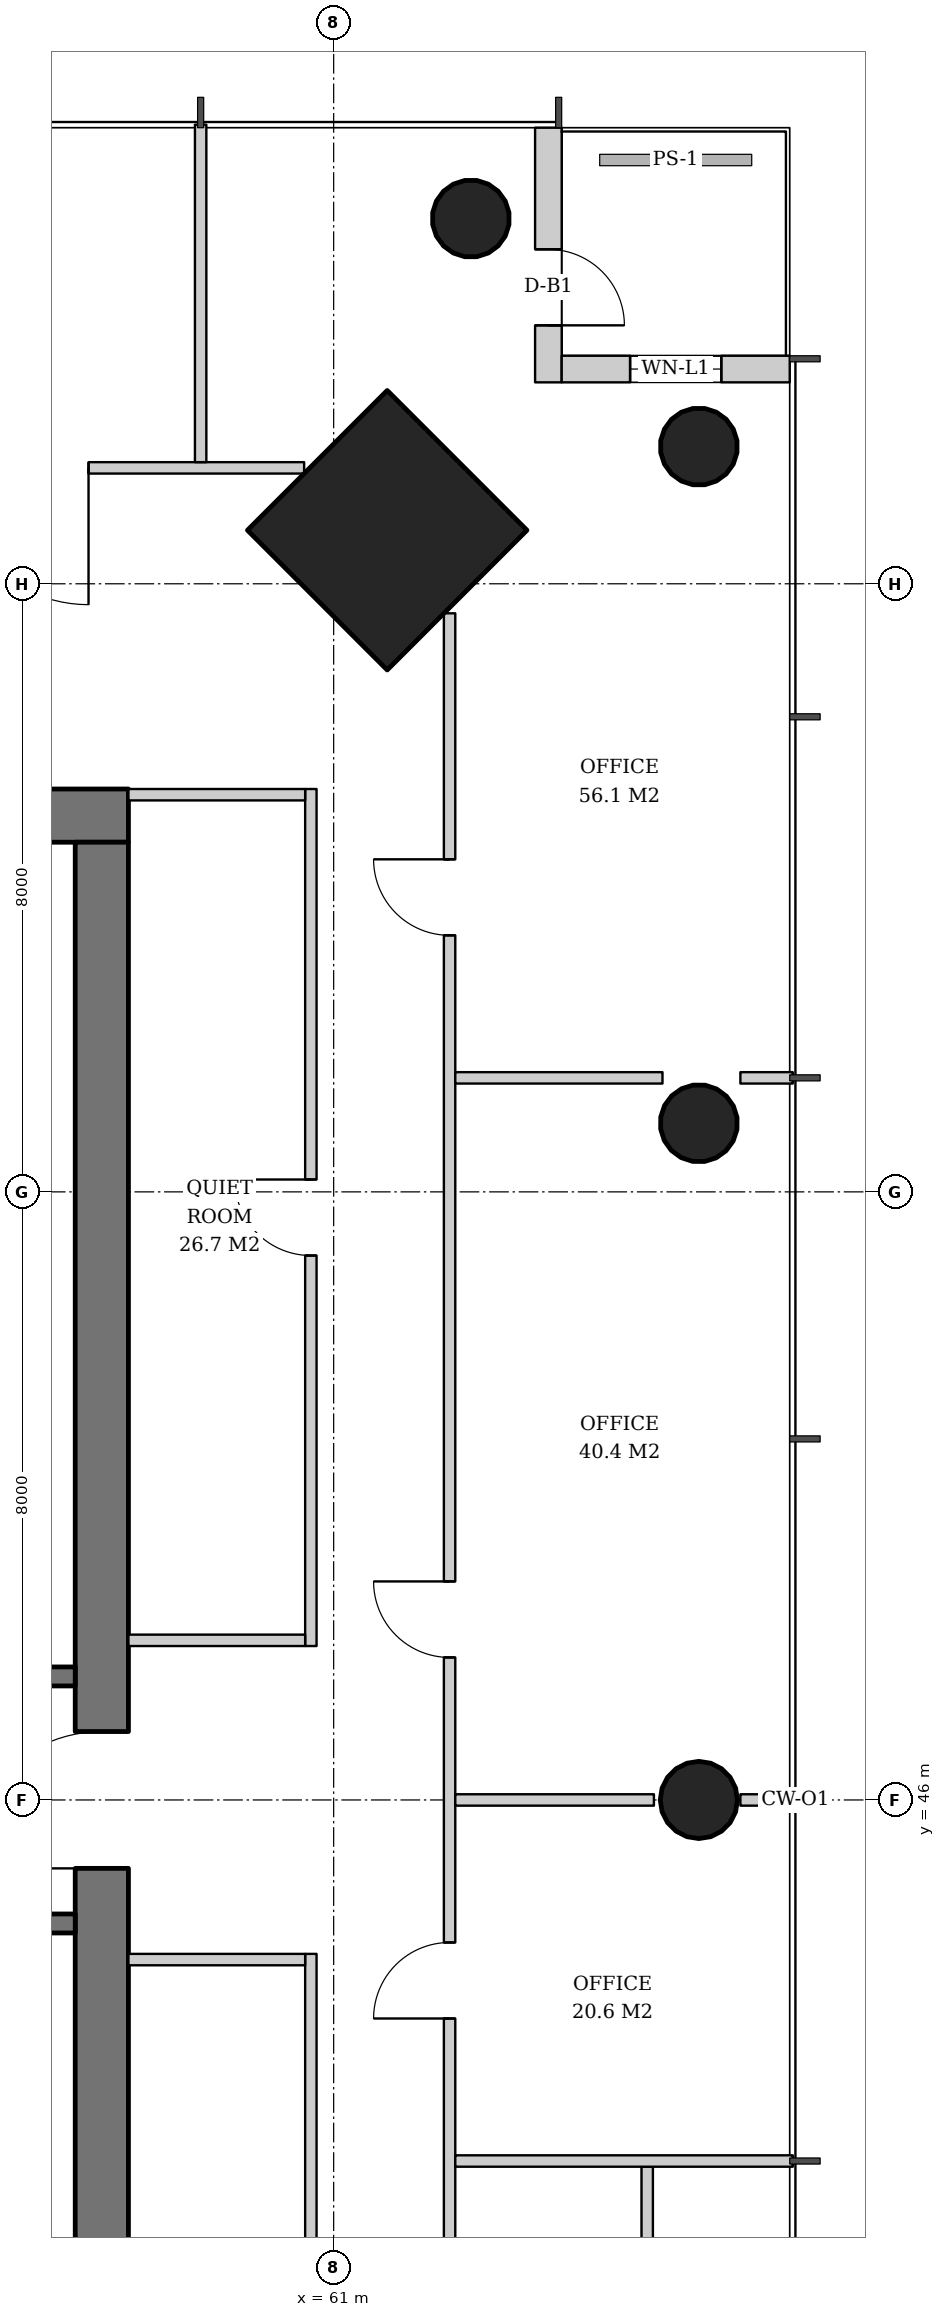
"""IFC4 building model, lengths in metres.
Left out: names, types, materials, properties, quantities, classifications, styles, units other than length and angle.
Written with IfcOpenShell. Run it as: python <this file> out.ifc"""

import sys

from ifc_helpers import new_model, si_unit, direction, frame, frame_2d, origin, origin_2d, place, context, subcontext, project, spatial, rectangle, hollow_circle, extrude, element, fill, save


model = new_model("IFC4")
c1 = context("Model", 3, precision=1e-05, world=origin(), true_north=direction((0.0, 1.0)))
c2 = subcontext(c1, "Body", "Model", "MODEL_VIEW")
j1 = project(units=[si_unit("LENGTHUNIT", "METRE"), si_unit("PLANEANGLEUNIT", "RADIAN")], contexts=[c1])
p1 = place(None, origin())
s1 = spatial("IfcSite", under=j1, at=p1, CompositionType="ELEMENT")
p2 = place(p1, origin())
s2 = spatial("IfcBuilding", under=s1, at=p2, CompositionType="ELEMENT")
p3 = place(p2, frame((0.0, 0.0, 119.8)))
s3 = spatial("IfcBuildingStorey", under=s2, at=p3, CompositionType="ELEMENT", Elevation=119.8)
p4 = place(p3, frame((61.743, 62.743, 0.0), z_axis=(-0.031962158256, -0.031962158256, 0.998977898093), x_axis=(0.707106781187, -0.707106781187, 0.0)))
e1 = element("IfcColumn", 1, at=p4, inside=s3, PredefinedType="COLUMN", context=c2, shape_type="SweptSolid", body=[
    extrude(rectangle(XDim=2.6, YDim=2.6, at=origin_2d()), origin(), (0.0, 0.0, 1.0), 3.804),
])
p5 = place(p3, frame((65.843, 63.843, 0.0), z_axis=(-0.031898107953, -0.031898107953, 0.998981992539), x_axis=(0.707106781187, -0.707106781187, 0.0)))
e2 = element("IfcColumn", 2, at=p5, inside=s3, PredefinedType="COLUMN", context=c2, shape_type="SweptSolid", body=[
    extrude(hollow_circle(Radius=0.508, WallThickness=0.04, at=origin_2d()), origin(), (0.0, 0.0, 1.0), 3.804),
])
p6 = place(p3, frame((65.843, 46.0, 0.0), z_axis=(-0.031914348339, 0.0, 0.999490607445), x_axis=(0.0, -1.0, 0.0)))
e3 = element("IfcColumn", 3, at=p6, inside=s3, PredefinedType="COLUMN", context=c2, shape_type="SweptSolid", body=[
    extrude(hollow_circle(Radius=0.508, WallThickness=0.04, at=origin_2d()), origin(), (0.0, 0.0, 1.0), 3.802),
])
p7 = place(p3, frame((65.843, 54.921, 0.0), z_axis=(-0.031910269556, -0.015987237665, 0.999362868496), x_axis=(0.447933021895, -0.894067115991, 0.0)))
e4 = element("IfcColumn", 4, at=p7, inside=s3, PredefinedType="COLUMN", context=c2, shape_type="SweptSolid", body=[
    extrude(hollow_circle(Radius=0.508, WallThickness=0.04, at=origin_2d()), origin(), (0.0, 0.0, 1.0), 3.802),
])
p8 = place(p3, frame((62.843, 66.843, 0.0), z_axis=(-0.031898107953, -0.031898107953, 0.998981992539), x_axis=(0.707106781187, -0.707106781187, 0.0)))
e5 = element("IfcColumn", 5, at=p8, inside=s3, PredefinedType="COLUMN", context=c2, shape_type="SweptSolid", body=[
    extrude(hollow_circle(Radius=0.508, WallThickness=0.04, at=origin_2d()), origin(), (0.0, 0.0, 1.0), 3.804),
])
p9 = place(p3, frame((31.7, 58.95, 0.0), z_axis=(0.0, 0.0, 1.0), x_axis=(1.0, 0.0, 0.0)))
e6 = element("IfcWall", 6, at=p9, inside=s3, PredefinedType="SHEAR", context=c2, shape_type="SweptSolid", body=[
    extrude(rectangle(XDim=26.6, YDim=0.7, at=frame_2d((13.3, 0.0))), origin(), (0.0, 0.0, 1.0), 3.8),
])
p10 = place(p9, frame((17.94, 0.0, 0.0)))
e7 = element("IfcOpeningElement", 7, at=p10, cuts=e6, PredefinedType="OPENING", context=c2, shape_type="SweptSolid", body=[
    extrude(rectangle(XDim=1.0, YDim=2.1, at=frame_2d((0.5, 1.05))), frame((0.0, 0.36, 0.0), z_axis=(0.0, -1.0, 0.0), x_axis=(1.0, 0.0, 0.0)), (0.0, 0.0, 1.0), 0.72),
])
p11 = place(p9, frame((5.825, 0.0, 0.0)))
e8 = element("IfcOpeningElement", 8, at=p11, cuts=e6, PredefinedType="OPENING", context=c2, shape_type="SweptSolid", body=[
    extrude(rectangle(XDim=1.0, YDim=2.1, at=frame_2d((0.5, 1.05))), frame((0.0, 0.36, 0.0), z_axis=(0.0, -1.0, 0.0), x_axis=(1.0, 0.0, 0.0)), (0.0, 0.0, 1.0), 0.72),
])
p12 = place(p9, frame((0.978, 0.0, 0.0)))
e9 = element("IfcOpeningElement", 9, at=p12, cuts=e6, PredefinedType="OPENING", context=c2, shape_type="SweptSolid", body=[
    extrude(rectangle(XDim=1.0, YDim=2.1, at=frame_2d((0.5, 1.05))), frame((0.0, 0.36, 0.0), z_axis=(0.0, -1.0, 0.0), x_axis=(1.0, 0.0, 0.0)), (0.0, 0.0, 1.0), 0.72),
])
p13 = place(p9, frame((2.492, 0.0, 0.0)))
e10 = element("IfcOpeningElement", 10, at=p13, cuts=e6, PredefinedType="OPENING", context=c2, shape_type="SweptSolid", body=[
    extrude(rectangle(XDim=1.0, YDim=2.1, at=frame_2d((0.5, 1.05))), frame((0.0, 0.36, 0.0), z_axis=(0.0, -1.0, 0.0), x_axis=(1.0, 0.0, 0.0)), (0.0, 0.0, 1.0), 0.72),
])
p14 = place(p9, frame((4.115, 0.0, 0.0)))
e11 = element("IfcOpeningElement", 11, at=p14, cuts=e6, PredefinedType="OPENING", context=c2, shape_type="SweptSolid", body=[
    extrude(rectangle(XDim=1.0, YDim=2.1, at=frame_2d((0.5, 1.05))), frame((0.0, 0.36, 0.0), z_axis=(0.0, -1.0, 0.0), x_axis=(1.0, 0.0, 0.0)), (0.0, 0.0, 1.0), 0.72),
])
p15 = place(p9, frame((9.126, 0.0, 0.0)))
e12 = element("IfcOpeningElement", 12, at=p15, cuts=e6, PredefinedType="OPENING", context=c2, shape_type="SweptSolid", body=[
    extrude(rectangle(XDim=1.0, YDim=2.1, at=frame_2d((0.5, 1.05))), frame((0.0, 0.36, 0.0), z_axis=(0.0, -1.0, 0.0), x_axis=(1.0, 0.0, 0.0)), (0.0, 0.0, 1.0), 0.72),
])
p16 = place(p9, frame((14.029, 0.0, 0.0)))
e13 = element("IfcOpeningElement", 13, at=p16, cuts=e6, PredefinedType="OPENING", context=c2, shape_type="SweptSolid", body=[
    extrude(rectangle(XDim=1.0, YDim=2.1, at=frame_2d((0.5, 1.05))), frame((0.0, 0.36, 0.0), z_axis=(0.0, -1.0, 0.0), x_axis=(1.0, 0.0, 0.0)), (0.0, 0.0, 1.0), 0.72),
])
p17 = place(p9, frame((22.4, 0.0, 0.0)))
e14 = element("IfcOpeningElement", 14, at=p17, cuts=e6, PredefinedType="OPENING", context=c2, shape_type="SweptSolid", body=[
    extrude(rectangle(XDim=1.0, YDim=2.1, at=frame_2d((0.5, 1.05))), frame((0.0, 0.36, 0.0), z_axis=(0.0, -1.0, 0.0), x_axis=(1.0, 0.0, 0.0)), (0.0, 0.0, 1.0), 0.72),
])
p18 = place(p3, frame((57.95, 33.4, 0.0), z_axis=(0.0, 0.0, 1.0), x_axis=(0.0, 1.0, 0.0)))
e15 = element("IfcWall", 15, at=p18, inside=s3, PredefinedType="SHEAR", context=c2, shape_type="SweptSolid", body=[
    extrude(rectangle(XDim=25.2, YDim=0.7, at=frame_2d((12.6, 0.0))), origin(), (0.0, 0.0, 1.0), 3.8),
])
p19 = place(p18, frame((11.7, 0.0, 0.0)))
e16 = element("IfcOpeningElement", 16, at=p19, cuts=e15, PredefinedType="OPENING", context=c2, shape_type="SweptSolid", body=[
    extrude(rectangle(XDim=1.8, YDim=2.4, at=frame_2d((0.9, 1.2))), frame((0.0, 0.36, 0.0), z_axis=(0.0, -1.0, 0.0), x_axis=(1.0, 0.0, 0.0)), (0.0, 0.0, 1.0), 0.72),
])
p20 = place(p3, frame((63.825, 68.0, 0.0), z_axis=(0.0, 0.0, 1.0), x_axis=(0.0, -1.0, 0.0)))
e17 = element("IfcWall", 17, at=p20, inside=s3, PredefinedType="SOLIDWALL", context=c2, shape_type="SweptSolid", body=[
    extrude(rectangle(XDim=3.35, YDim=0.35, at=frame_2d((1.675, 0.0))), origin(), (0.0, 0.0, 1.0), 3.62),
])
p21 = place(p20, frame((1.6, 0.0, 0.0)))
e18 = element("IfcOpeningElement", 18, at=p21, cuts=e17, PredefinedType="OPENING", context=c2, shape_type="SweptSolid", body=[
    extrude(rectangle(XDim=1.0, YDim=2.4, at=frame_2d((0.5, 1.2))), frame((0.0, 0.185, 0.0), z_axis=(0.0, -1.0, 0.0), x_axis=(1.0, 0.0, 0.0)), (0.0, 0.0, 1.0), 0.37),
])
p22 = place(p3, frame((64.0, 64.825, 0.0), z_axis=(0.0, 0.0, 1.0), x_axis=(1.0, 0.0, 0.0)))
e19 = element("IfcWall", 19, at=p22, inside=s3, PredefinedType="SOLIDWALL", context=c2, shape_type="SweptSolid", body=[
    extrude(rectangle(XDim=3.0, YDim=0.35, at=frame_2d((1.5, 0.0))), origin(), (0.0, 0.0, 1.0), 3.62),
])
p23 = place(p22, frame((0.9, 0.0, 0.6)))
e20 = element("IfcOpeningElement", 20, at=p23, cuts=e19, PredefinedType="OPENING", context=c2, shape_type="SweptSolid", body=[
    extrude(rectangle(XDim=1.2, YDim=2.55, at=frame_2d((0.6, 1.275))), frame((0.0, 0.185, 0.0), z_axis=(0.0, -1.0, 0.0), x_axis=(1.0, 0.0, 0.0)), (0.0, 0.0, 1.0), 0.37),
])
for number, where, z_axis, x_axis in (
    (21, (54.9, 44.375, 0.0), (0.0, 0.0, 1.0), (1.0, 0.0, 0.0)),
    (22, (54.9, 47.625, 0.0), (0.0, 0.0, 1.0), (1.0, 0.0, 0.0)),
):
    element("IfcWall", number, at=place(p3, frame(where, z_axis=z_axis, x_axis=x_axis)), inside=s3, PredefinedType="SOLIDWALL", context=c2, shape_type="SweptSolid", body=[
        extrude(rectangle(XDim=2.7, YDim=0.25, at=frame_2d((1.35, 0.0))), origin(), (0.0, 0.0, 1.0), 3.62),
    ])
p24 = place(p3, frame((60.7, 32.7, 0.0), z_axis=(0.0, 0.0, 1.0), x_axis=(0.0, 1.0, 0.0)))
e23 = element("IfcWall", 23, at=p24, inside=s3, PredefinedType="PARTITIONING", context=c2, shape_type="SweptSolid", body=[
    extrude(rectangle(XDim=11.275, YDim=0.15, at=frame_2d((5.638, 0.0))), origin(), (0.0, 0.0, 1.0), 2.72),
])
p25 = place(p24, frame((5.137, 0.0, 0.0)))
e24 = element("IfcOpeningElement", 24, at=p25, cuts=e23, PredefinedType="OPENING", context=c2, shape_type="SweptSolid", body=[
    extrude(rectangle(XDim=1.0, YDim=2.1, at=frame_2d((0.5, 1.05))), frame((0.0, 0.085, 0.0), z_axis=(0.0, -1.0, 0.0), x_axis=(1.0, 0.0, 0.0)), (0.0, 0.0, 1.0), 0.17),
])
p26 = place(p3, frame((58.3, 43.9, 0.0), z_axis=(0.0, 0.0, 1.0), x_axis=(1.0, 0.0, 0.0)))
e25 = element("IfcWall", 25, at=p26, inside=s3, PredefinedType="PARTITIONING", context=c2, shape_type="SweptSolid", body=[
    extrude(rectangle(XDim=2.325, YDim=0.15, at=frame_2d((1.163, 0.0))), origin(), (0.0, 0.0, 1.0), 3.62),
])
p27 = place(p3, frame((60.7, 48.025, 0.0), z_axis=(0.0, 0.0, 1.0), x_axis=(0.0, 1.0, 0.0)))
e26 = element("IfcWall", 26, at=p27, inside=s3, PredefinedType="PARTITIONING", context=c2, shape_type="SweptSolid", body=[
    extrude(rectangle(XDim=11.275, YDim=0.15, at=frame_2d((5.638, 0.0))), origin(), (0.0, 0.0, 1.0), 2.806),
])
p28 = place(p27, frame((5.137, 0.0, 0.0)))
e27 = element("IfcOpeningElement", 27, at=p28, cuts=e26, PredefinedType="OPENING", context=c2, shape_type="SweptSolid", body=[
    extrude(rectangle(XDim=1.0, YDim=2.1, at=frame_2d((0.5, 1.05))), frame((0.0, 0.085, 0.0), z_axis=(0.0, -1.0, 0.0), x_axis=(1.0, 0.0, 0.0)), (0.0, 0.0, 1.0), 0.17),
])
for number, where, z_axis, x_axis in (
    (28, (58.3, 48.1, 0.0), (0.0, 0.0, 1.0), (1.0, 0.0, 0.0)),
    (29, (58.3, 59.225, 0.0), (0.0, 0.0, 1.0), (1.0, 0.0, 0.0)),
):
    element("IfcWall", number, at=place(p3, frame(where, z_axis=z_axis, x_axis=x_axis)), inside=s3, PredefinedType="PARTITIONING", context=c2, shape_type="SweptSolid", body=[
        extrude(rectangle(XDim=2.325, YDim=0.15, at=frame_2d((1.163, 0.0))), origin(), (0.0, 0.0, 1.0), 3.62),
    ])
p29 = place(p3, frame((65.125, 37.74, 0.0), z_axis=(0.0, 0.0, 1.0), x_axis=(0.0, 1.0, 0.0)))
e30 = element("IfcWall", 30, at=p29, inside=s3, PredefinedType="PARTITIONING", context=c2, shape_type="SweptSolid", body=[
    extrude(rectangle(XDim=3.435, YDim=0.15, at=frame_2d((1.717, 0.0))), origin(), (0.0, 0.0, 1.0), 3.62),
])
p30 = place(p3, frame((62.525, 30.388, 0.0), z_axis=(0.0, 0.0, 1.0), x_axis=(0.0, 1.0, 0.0)))
e31 = element("IfcWall", 31, at=p30, inside=s3, PredefinedType="PARTITIONING", context=c2, shape_type="SweptSolid", body=[
    extrude(rectangle(XDim=31.223, YDim=0.15, at=frame_2d((15.612, 0.0))), origin(), (0.0, 0.0, 1.0), 2.72),
])
p31 = place(p30, frame((3.237, 0.0, 0.0)))
e32 = element("IfcOpeningElement", 32, at=p31, cuts=e31, PredefinedType="OPENING", context=c2, shape_type="SweptSolid", body=[
    extrude(rectangle(XDim=1.0, YDim=2.1, at=frame_2d((0.5, 1.05))), frame((0.0, 0.085, 0.0), z_axis=(0.0, -1.0, 0.0), x_axis=(1.0, 0.0, 0.0)), (0.0, 0.0, 1.0), 0.17),
])
p32 = place(p30, frame((7.987, 0.0, 0.0)))
e33 = element("IfcOpeningElement", 33, at=p32, cuts=e31, PredefinedType="OPENING", context=c2, shape_type="SweptSolid", body=[
    extrude(rectangle(XDim=1.0, YDim=2.1, at=frame_2d((0.5, 1.05))), frame((0.0, 0.085, 0.0), z_axis=(0.0, -1.0, 0.0), x_axis=(1.0, 0.0, 0.0)), (0.0, 0.0, 1.0), 0.17),
])
p33 = place(p30, frame((12.737, 0.0, 0.0)))
e34 = element("IfcOpeningElement", 34, at=p33, cuts=e31, PredefinedType="OPENING", context=c2, shape_type="SweptSolid", body=[
    extrude(rectangle(XDim=1.0, YDim=2.1, at=frame_2d((0.5, 1.05))), frame((0.0, 0.085, 0.0), z_axis=(0.0, -1.0, 0.0), x_axis=(1.0, 0.0, 0.0)), (0.0, 0.0, 1.0), 0.17),
])
p34 = place(p30, frame((17.487, 0.0, 0.0)))
e35 = element("IfcOpeningElement", 35, at=p34, cuts=e31, PredefinedType="OPENING", context=c2, shape_type="SweptSolid", body=[
    extrude(rectangle(XDim=1.0, YDim=2.1, at=frame_2d((0.5, 1.05))), frame((0.0, 0.085, 0.0), z_axis=(0.0, -1.0, 0.0), x_axis=(1.0, 0.0, 0.0)), (0.0, 0.0, 1.0), 0.17),
])
p35 = place(p30, frame((26.987, 0.0, 0.0)))
e36 = element("IfcOpeningElement", 36, at=p35, cuts=e31, PredefinedType="OPENING", context=c2, shape_type="SweptSolid", body=[
    extrude(rectangle(XDim=1.0, YDim=2.1, at=frame_2d((0.5, 1.05))), frame((0.0, 0.085, 0.0), z_axis=(0.0, -1.0, 0.0), x_axis=(1.0, 0.0, 0.0)), (0.0, 0.0, 1.0), 0.17),
])
p36 = place(p3, frame((62.6, 41.25, 0.0), z_axis=(0.0, 0.0, 1.0), x_axis=(1.0, 0.0, 0.0)))
e37 = element("IfcWall", 37, at=p36, inside=s3, PredefinedType="PARTITIONING", context=c2, shape_type="SweptSolid", body=[
    extrude(rectangle(XDim=4.44, YDim=0.15, at=frame_2d((2.22, 0.0))), origin(), (0.0, 0.0, 1.0), 2.82),
])
p37 = place(p3, frame((62.6, 46.0, 0.0), z_axis=(0.0, 0.0, 1.0), x_axis=(1.0, 0.0, 0.0)))
e38 = element("IfcWall", 38, at=p37, inside=s3, PredefinedType="PARTITIONING", context=c2, shape_type="SweptSolid", body=[
    extrude(rectangle(XDim=2.613, YDim=0.15, at=frame_2d((1.307, 0.0))), origin(), (0.0, 0.0, 1.0), 3.62),
])
p38 = place(p3, frame((66.351, 46.0, 0.0), z_axis=(0.0, 0.0, 1.0), x_axis=(1.0, 0.0, 0.0)))
e39 = element("IfcWall", 39, at=p38, inside=s3, PredefinedType="PARTITIONING", context=c2, shape_type="SweptSolid", body=[
    extrude(rectangle(XDim=0.689, YDim=0.15, at=frame_2d((0.345, 0.0))), origin(), (0.0, 0.0, 1.0), 3.62),
])
p39 = place(p3, frame((62.6, 55.5, 0.0), z_axis=(0.0, 0.0, 1.0), x_axis=(1.0, 0.0, 0.0)))
e40 = element("IfcWall", 40, at=p39, inside=s3, PredefinedType="PARTITIONING", context=c2, shape_type="SweptSolid", body=[
    extrude(rectangle(XDim=2.726, YDim=0.15, at=frame_2d((1.363, 0.0))), origin(), (0.0, 0.0, 1.0), 3.62),
])
p40 = place(p3, frame((66.351, 55.5, 0.0), z_axis=(0.0, 0.0, 1.0), x_axis=(1.0, 0.0, 0.0)))
e41 = element("IfcWall", 41, at=p40, inside=s3, PredefinedType="PARTITIONING", context=c2, shape_type="SweptSolid", body=[
    extrude(rectangle(XDim=0.689, YDim=0.15, at=frame_2d((0.345, 0.0))), origin(), (0.0, 0.0, 1.0), 3.62),
])
p41 = place(p3, frame((60.612, 63.525, 0.0), z_axis=(0.0, 0.0, 1.0), x_axis=(-1.0, 0.0, 0.0)))
e42 = element("IfcWall", 42, at=p41, inside=s3, PredefinedType="PARTITIONING", context=c2, shape_type="SweptSolid", body=[
    extrude(rectangle(XDim=31.223, YDim=0.15, at=frame_2d((15.612, 0.0))), origin(), (0.0, 0.0, 1.0), 2.72),
])
p42 = place(p41, frame((2.836, 0.0, 0.0)))
e43 = element("IfcOpeningElement", 43, at=p42, cuts=e42, PredefinedType="OPENING", context=c2, shape_type="SweptSolid", body=[
    extrude(rectangle(XDim=1.8, YDim=2.4, at=frame_2d((0.9, 1.2))), frame((0.0, 0.085, 0.0), z_axis=(0.0, -1.0, 0.0), x_axis=(1.0, 0.0, 0.0)), (0.0, 0.0, 1.0), 0.17),
])
p43 = place(p41, frame((7.586, 0.0, 0.0)))
e44 = element("IfcOpeningElement", 44, at=p43, cuts=e42, PredefinedType="OPENING", context=c2, shape_type="SweptSolid", body=[
    extrude(rectangle(XDim=1.8, YDim=2.4, at=frame_2d((0.9, 1.2))), frame((0.0, 0.085, 0.0), z_axis=(0.0, -1.0, 0.0), x_axis=(1.0, 0.0, 0.0)), (0.0, 0.0, 1.0), 0.17),
])
p44 = place(p3, frame((59.25, 63.6, 0.0), z_axis=(0.0, 0.0, 1.0), x_axis=(0.0, 1.0, 0.0)))
e45 = element("IfcWall", 45, at=p44, inside=s3, PredefinedType="PARTITIONING", context=c2, shape_type="SweptSolid", body=[
    extrude(rectangle(XDim=4.44, YDim=0.15, at=frame_2d((2.22, 0.0))), origin(), (0.0, 0.0, 1.0), 2.82),
])
p45 = place(p21, origin())
e46 = element("IfcDoor", 46, at=p45, inside=s3, OperationType="SINGLE_SWING_RIGHT", PredefinedType="DOOR", context=c2, shape_type="SweptSolid", body=[
    extrude(rectangle(XDim=1.0, YDim=2.4, at=frame_2d((0.5, 1.2))), frame((0.0, 0.025, 0.0), z_axis=(0.0, -1.0, 0.0), x_axis=(1.0, 0.0, 0.0)), (0.0, 0.0, 1.0), 0.05),
])
fill(e18, e46)
p46 = place(p23, origin())
e47 = element("IfcWindow", 47, at=p46, inside=s3, PartitioningType="SINGLE_PANEL", PredefinedType="WINDOW", context=c2, shape_type="SweptSolid", body=[
    extrude(rectangle(XDim=1.2, YDim=2.55, at=frame_2d((0.6, 1.275))), frame((0.0, 0.03, 0.0), z_axis=(0.0, -1.0, 0.0), x_axis=(1.0, 0.0, 0.0)), (0.0, 0.0, 1.0), 0.06),
])
fill(e20, e47)
p47 = place(p19, origin())
e48 = element("IfcDoor", 48, at=p47, inside=s3, OperationType="DOUBLE_DOOR_SINGLE_SWING", PredefinedType="DOOR", context=c2, shape_type="SweptSolid", body=[
    extrude(rectangle(XDim=1.8, YDim=2.4, at=frame_2d((0.9, 1.2))), frame((0.0, 0.025, 0.0), z_axis=(0.0, -1.0, 0.0), x_axis=(1.0, 0.0, 0.0)), (0.0, 0.0, 1.0), 0.05),
])
fill(e16, e48)
p48 = place(p28, origin())
e49 = element("IfcDoor", 49, at=p48, inside=s3, OperationType="SINGLE_SWING_RIGHT", PredefinedType="DOOR", context=c2, shape_type="SweptSolid", body=[
    extrude(rectangle(XDim=1.0, YDim=2.1, at=frame_2d((0.5, 1.05))), frame((0.0, 0.025, 0.0), z_axis=(0.0, -1.0, 0.0), x_axis=(1.0, 0.0, 0.0)), (0.0, 0.0, 1.0), 0.05),
])
fill(e27, e49)
p49 = place(p33, origin())
e50 = element("IfcDoor", 50, at=p49, inside=s3, OperationType="SINGLE_SWING_LEFT", PredefinedType="DOOR", context=c2, shape_type="SweptSolid", body=[
    extrude(rectangle(XDim=1.0, YDim=2.1, at=frame_2d((0.5, 1.05))), frame((0.0, 0.025, 0.0), z_axis=(0.0, -1.0, 0.0), x_axis=(1.0, 0.0, 0.0)), (0.0, 0.0, 1.0), 0.05),
])
fill(e34, e50)
p50 = place(p34, origin())
e51 = element("IfcDoor", 51, at=p50, inside=s3, OperationType="SINGLE_SWING_RIGHT", PredefinedType="DOOR", context=c2, shape_type="SweptSolid", body=[
    extrude(rectangle(XDim=1.0, YDim=2.1, at=frame_2d((0.5, 1.05))), frame((0.0, 0.025, 0.0), z_axis=(0.0, -1.0, 0.0), x_axis=(1.0, 0.0, 0.0)), (0.0, 0.0, 1.0), 0.05),
])
fill(e35, e51)
p51 = place(p35, origin())
e52 = element("IfcDoor", 52, at=p51, inside=s3, OperationType="SINGLE_SWING_RIGHT", PredefinedType="DOOR", context=c2, shape_type="SweptSolid", body=[
    extrude(rectangle(XDim=1.0, YDim=2.1, at=frame_2d((0.5, 1.05))), frame((0.0, 0.025, 0.0), z_axis=(0.0, -1.0, 0.0), x_axis=(1.0, 0.0, 0.0)), (0.0, 0.0, 1.0), 0.05),
])
fill(e36, e52)
p52 = place(p42, origin())
e53 = element("IfcDoor", 53, at=p52, inside=s3, OperationType="DOUBLE_DOOR_SINGLE_SWING", PredefinedType="DOOR", context=c2, shape_type="SweptSolid", body=[
    extrude(rectangle(XDim=1.8, YDim=2.4, at=frame_2d((0.9, 1.2))), frame((0.0, 0.025, 0.0), z_axis=(0.0, -1.0, 0.0), x_axis=(1.0, 0.0, 0.0)), (0.0, 0.0, 1.0), 0.05),
])
fill(e43, e53)
save(model, sys.argv[1])
